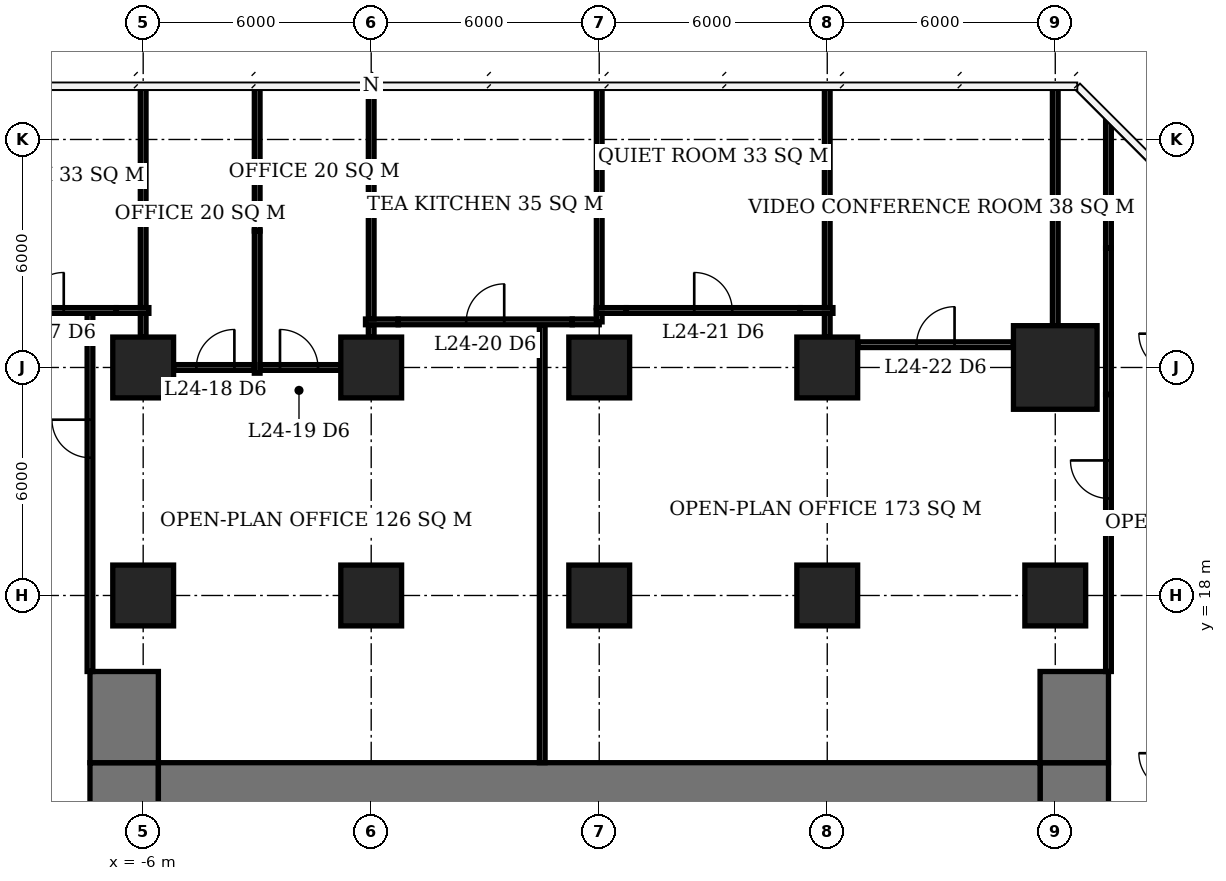
"""IFC4 building model, lengths in metres.
Left out: names, types, materials, properties, quantities, classifications, styles, units other than length and angle.
Written with IfcOpenShell. Run it as: python <this file> out.ifc"""

import sys

from ifc_helpers import new_model, si_unit, direction, frame, frame_2d, origin, origin_2d, place, context, subcontext, project, spatial, rectangle, extrude, element, fill, save


model = new_model("IFC4")
c1 = context("Model", 3, precision=1e-05, world=origin(), true_north=direction((0.0, 1.0)))
c2 = subcontext(c1, "Body", "Model", "MODEL_VIEW")
j1 = project(units=[si_unit("LENGTHUNIT", "METRE"), si_unit("PLANEANGLEUNIT", "RADIAN")], contexts=[c1])
p1 = place(None, origin())
s1 = spatial("IfcSite", under=j1, at=p1, CompositionType="ELEMENT")
p2 = place(p1, origin())
s2 = spatial("IfcBuilding", under=s1, at=p2, CompositionType="ELEMENT")
p3 = place(p2, frame((0.0, 0.0, 101.6)))
s3 = spatial("IfcBuildingStorey", under=s2, at=p3, CompositionType="ELEMENT", Elevation=101.6)
for number, where, z_axis, x_axis in (
    (1, (-6.0, 18.0, 0.0), (0.0, 0.0, 1.0), (1.0, 0.0, 0.0)),
    (2, (-6.0, 24.0, 0.0), (0.0, 0.0, 1.0), (1.0, 0.0, 0.0)),
    (3, (0.0, 18.0, 0.0), (0.0, 0.0, 1.0), (1.0, 0.0, 0.0)),
    (4, (0.0, 24.0, 0.0), (0.0, 0.0, 1.0), (1.0, 0.0, 0.0)),
    (5, (6.0, 18.0, 0.0), (0.0, 0.0, 1.0), (1.0, 0.0, 0.0)),
    (6, (6.0, 24.0, 0.0), (0.0, 0.0, 1.0), (1.0, 0.0, 0.0)),
    (7, (12.0, 18.0, 0.0), (0.0, 0.0, 1.0), (1.0, 0.0, 0.0)),
    (8, (12.0, 24.0, 0.0), (0.0, 0.0, 1.0), (1.0, 0.0, 0.0)),
    (9, (18.0, 18.0, 0.0), (0.0, 0.0, 1.0), (1.0, 0.0, 0.0)),
):
    element("IfcColumn", number, at=place(p3, frame(where, z_axis=z_axis, x_axis=x_axis)), inside=s3, PredefinedType="COLUMN", context=c2, shape_type="SweptSolid", body=[
        extrude(rectangle(XDim=1.6, YDim=1.6, at=origin_2d()), origin(), (0.0, 0.0, 1.0), 3.9),
    ])
p4 = place(p3, frame((18.0, 24.0, 0.0), z_axis=(0.0, 0.0, 1.0), x_axis=(1.0, 0.0, 0.0)))
e10 = element("IfcColumn", 10, at=p4, inside=s3, PredefinedType="COLUMN", context=c2, shape_type="SweptSolid", body=[
    extrude(rectangle(XDim=2.2, YDim=2.2, at=origin_2d()), origin(), (0.0, 0.0, 1.0), 3.9),
])
p5 = place(p3, frame((-5.6, 12.6, 0.0), z_axis=(0.0, 0.0, 1.0), x_axis=(1.0, 0.0, 0.0)))
e11 = element("IfcWall", 11, at=p5, inside=s3, PredefinedType="SHEAR", context=c2, shape_type="SweptSolid", body=[
    extrude(rectangle(XDim=23.2, YDim=2.0, at=frame_2d((11.6, 0.0))), origin(), (0.0, 0.0, 1.0), 3.9),
])
p6 = place(p3, frame((-6.5, -7.6, 0.0), z_axis=(0.0, 0.0, 1.0), x_axis=(0.0, 1.0, 0.0)))
e12 = element("IfcWall", 12, at=p6, inside=s3, PredefinedType="SHEAR", context=c2, shape_type="SweptSolid", body=[
    extrude(rectangle(XDim=21.2, YDim=1.8, at=frame_2d((10.6, 0.0))), origin(), (0.0, 0.0, 1.0), 3.9),
])
p7 = place(p6, frame((7.8, 0.0, 0.0)))
e13 = element("IfcOpeningElement", 13, at=p7, cuts=e12, PredefinedType="OPENING", context=c2, shape_type="SweptSolid", body=[
    extrude(rectangle(XDim=1.8, YDim=2.4, at=frame_2d((0.9, 1.2))), frame((0.0, 0.91, 0.0), z_axis=(0.0, -1.0, 0.0), x_axis=(1.0, 0.0, 0.0)), (0.0, 0.0, 1.0), 1.82),
])
p8 = place(p3, frame((18.5, -7.6, 0.0), z_axis=(0.0, 0.0, 1.0), x_axis=(0.0, 1.0, 0.0)))
e14 = element("IfcWall", 14, at=p8, inside=s3, PredefinedType="SHEAR", context=c2, shape_type="SweptSolid", body=[
    extrude(rectangle(XDim=21.2, YDim=1.8, at=frame_2d((10.6, 0.0))), origin(), (0.0, 0.0, 1.0), 3.9),
])
p9 = place(p8, frame((9.2, 0.0, 0.0)))
e15 = element("IfcOpeningElement", 15, at=p9, cuts=e14, PredefinedType="OPENING", context=c2, shape_type="SweptSolid", body=[
    extrude(rectangle(XDim=1.8, YDim=2.4, at=frame_2d((0.9, 1.2))), frame((0.0, 0.91, 0.0), z_axis=(0.0, -1.0, 0.0), x_axis=(1.0, 0.0, 0.0)), (0.0, 0.0, 1.0), 1.82),
])
for number, where, z_axis, x_axis in (
    (16, (-6.5, 13.6, 0.0), (0.0, 0.0, 1.0), (0.0, 1.0, 0.0)),
    (17, (18.5, 13.6, 0.0), (0.0, 0.0, 1.0), (0.0, 1.0, 0.0)),
):
    element("IfcWall", number, at=place(p3, frame(where, z_axis=z_axis, x_axis=x_axis)), inside=s3, PredefinedType="SHEAR", context=c2, shape_type="SweptSolid", body=[
        extrude(rectangle(XDim=2.4, YDim=1.8, at=frame_2d((1.2, 0.0))), origin(), (0.0, 0.0, 1.0), 3.9),
    ])
p10 = place(p3, frame((-5.2, 24.0, 0.0), z_axis=(0.0, 0.0, 1.0), x_axis=(1.0, 0.0, 0.0)))
e18 = element("IfcWall", 18, at=p10, inside=s3, PredefinedType="PARTITIONING", context=c2, shape_type="SweptSolid", body=[
    extrude(rectangle(XDim=2.125, YDim=0.15, at=frame_2d((1.062, 0.0))), origin(), (0.0, 0.0, 1.0), 3.65),
])
p11 = place(p10, frame((0.6, 0.0, 0.0)))
e19 = element("IfcOpeningElement", 19, at=p11, cuts=e18, PredefinedType="OPENING", context=c2, shape_type="SweptSolid", body=[
    extrude(rectangle(XDim=1.0, YDim=2.1, at=frame_2d((0.5, 1.05))), frame((0.0, 0.085, 0.0), z_axis=(0.0, -1.0, 0.0), x_axis=(1.0, 0.0, 0.0)), (0.0, 0.0, 1.0), 0.17),
])
p12 = place(p3, frame((-2.925, 24.0, 0.0), z_axis=(0.0, 0.0, 1.0), x_axis=(1.0, 0.0, 0.0)))
e20 = element("IfcWall", 20, at=p12, inside=s3, PredefinedType="PARTITIONING", context=c2, shape_type="SweptSolid", body=[
    extrude(rectangle(XDim=2.125, YDim=0.15, at=frame_2d((1.062, 0.0))), origin(), (0.0, 0.0, 1.0), 3.65),
])
p13 = place(p12, frame((0.525, 0.0, 0.0)))
e21 = element("IfcOpeningElement", 21, at=p13, cuts=e20, PredefinedType="OPENING", context=c2, shape_type="SweptSolid", body=[
    extrude(rectangle(XDim=1.0, YDim=2.1, at=frame_2d((0.5, 1.05))), frame((0.0, 0.085, 0.0), z_axis=(0.0, -1.0, 0.0), x_axis=(1.0, 0.0, 0.0)), (0.0, 0.0, 1.0), 0.17),
])
p14 = place(p3, frame((12.8, 24.6, 0.0), z_axis=(0.0, 0.0, 1.0), x_axis=(1.0, 0.0, 0.0)))
e22 = element("IfcWall", 22, at=p14, inside=s3, PredefinedType="PARTITIONING", context=c2, shape_type="SweptSolid", body=[
    extrude(rectangle(XDim=4.1, YDim=0.15, at=frame_2d((2.05, 0.0))), origin(), (0.0, 0.0, 1.0), 3.65),
])
p15 = place(p14, frame((1.55, 0.0, 0.0)))
e23 = element("IfcOpeningElement", 23, at=p15, cuts=e22, PredefinedType="OPENING", context=c2, shape_type="SweptSolid", body=[
    extrude(rectangle(XDim=1.0, YDim=2.1, at=frame_2d((0.5, 1.05))), frame((0.0, 0.085, 0.0), z_axis=(0.0, -1.0, 0.0), x_axis=(1.0, 0.0, 0.0)), (0.0, 0.0, 1.0), 0.17),
])
p16 = place(p3, frame((-0.15, 25.2, 0.0), z_axis=(0.0, 0.0, 1.0), x_axis=(1.0, 0.0, 0.0)))
e24 = element("IfcWall", 24, at=p16, inside=s3, PredefinedType="PARTITIONING", context=c2, shape_type="SweptSolid", body=[
    extrude(rectangle(XDim=0.86, YDim=0.15, at=frame_2d((0.43, 0.0))), origin(), (0.0, 0.0, 1.0), 2.65),
])
p17 = place(p3, frame((0.71, 25.2, 0.0), z_axis=(0.0, 0.0, 1.0), x_axis=(1.0, 0.0, 0.0)))
e25 = element("IfcWall", 25, at=p17, inside=s3, PredefinedType="PARTITIONING", context=c2, shape_type="SweptSolid", body=[
    extrude(rectangle(XDim=4.58, YDim=0.15, at=frame_2d((2.29, 0.0))), origin(), (0.0, 0.0, 1.0), 3.65),
])
p18 = place(p17, frame((1.79, 0.0, 0.0)))
e26 = element("IfcOpeningElement", 26, at=p18, cuts=e25, PredefinedType="OPENING", context=c2, shape_type="SweptSolid", body=[
    extrude(rectangle(XDim=1.0, YDim=2.1, at=frame_2d((0.5, 1.05))), frame((0.0, 0.085, 0.0), z_axis=(0.0, -1.0, 0.0), x_axis=(1.0, 0.0, 0.0)), (0.0, 0.0, 1.0), 0.17),
])
p19 = place(p3, frame((5.29, 25.2, 0.0), z_axis=(0.0, 0.0, 1.0), x_axis=(1.0, 0.0, 0.0)))
e27 = element("IfcWall", 27, at=p19, inside=s3, PredefinedType="PARTITIONING", context=c2, shape_type="SweptSolid", body=[
    extrude(rectangle(XDim=0.71, YDim=0.15, at=frame_2d((0.355, 0.0))), origin(), (0.0, 0.0, 1.0), 2.65),
])
p20 = place(p3, frame((-11.49, 25.5, 0.0), z_axis=(0.0, 0.0, 1.0), x_axis=(1.0, 0.0, 0.0)))
e28 = element("IfcWall", 28, at=p20, inside=s3, PredefinedType="PARTITIONING", context=c2, shape_type="SweptSolid", body=[
    extrude(rectangle(XDim=4.78, YDim=0.15, at=frame_2d((2.39, 0.0))), origin(), (0.0, 0.0, 1.0), 3.65),
])
p21 = place(p20, frame((2.4, 0.0, 0.0)))
e29 = element("IfcOpeningElement", 29, at=p21, cuts=e28, PredefinedType="OPENING", context=c2, shape_type="SweptSolid", body=[
    extrude(rectangle(XDim=1.0, YDim=2.1, at=frame_2d((0.5, 1.05))), frame((0.0, 0.085, 0.0), z_axis=(0.0, -1.0, 0.0), x_axis=(1.0, 0.0, 0.0)), (0.0, 0.0, 1.0), 0.17),
])
p22 = place(p3, frame((-6.71, 25.5, 0.0), z_axis=(0.0, 0.0, 1.0), x_axis=(1.0, 0.0, 0.0)))
e30 = element("IfcWall", 30, at=p22, inside=s3, PredefinedType="PARTITIONING", context=c2, shape_type="SweptSolid", body=[
    extrude(rectangle(XDim=0.86, YDim=0.15, at=frame_2d((0.43, 0.0))), origin(), (0.0, 0.0, 1.0), 2.65),
])
p23 = place(p3, frame((5.925, 25.5, 0.0), z_axis=(0.0, 0.0, 1.0), x_axis=(1.0, 0.0, 0.0)))
e31 = element("IfcWall", 31, at=p23, inside=s3, PredefinedType="PARTITIONING", context=c2, shape_type="SweptSolid", body=[
    extrude(rectangle(XDim=0.785, YDim=0.15, at=frame_2d((0.393, 0.0))), origin(), (0.0, 0.0, 1.0), 2.65),
])
p24 = place(p3, frame((6.71, 25.5, 0.0), z_axis=(0.0, 0.0, 1.0), x_axis=(1.0, 0.0, 0.0)))
e32 = element("IfcWall", 32, at=p24, inside=s3, PredefinedType="PARTITIONING", context=c2, shape_type="SweptSolid", body=[
    extrude(rectangle(XDim=4.58, YDim=0.15, at=frame_2d((2.29, 0.0))), origin(), (0.0, 0.0, 1.0), 3.65),
])
p25 = place(p24, frame((1.79, 0.0, 0.0)))
e33 = element("IfcOpeningElement", 33, at=p25, cuts=e32, PredefinedType="OPENING", context=c2, shape_type="SweptSolid", body=[
    extrude(rectangle(XDim=1.0, YDim=2.1, at=frame_2d((0.5, 1.05))), frame((0.0, 0.085, 0.0), z_axis=(0.0, -1.0, 0.0), x_axis=(1.0, 0.0, 0.0)), (0.0, 0.0, 1.0), 0.17),
])
p26 = place(p3, frame((11.29, 25.5, 0.0), z_axis=(0.0, 0.0, 1.0), x_axis=(1.0, 0.0, 0.0)))
e34 = element("IfcWall", 34, at=p26, inside=s3, PredefinedType="PARTITIONING", context=c2, shape_type="SweptSolid", body=[
    extrude(rectangle(XDim=0.86, YDim=0.15, at=frame_2d((0.43, 0.0))), origin(), (0.0, 0.0, 1.0), 2.65),
])
p27 = place(p3, frame((-6.0, 24.8, 0.0), z_axis=(0.0, 0.0, 1.0), x_axis=(0.0, 1.0, 0.0)))
e35 = element("IfcWall", 35, at=p27, inside=s3, PredefinedType="PARTITIONING", context=c2, shape_type="SweptSolid", body=[
    extrude(rectangle(XDim=0.625, YDim=0.15, at=frame_2d((0.312, 0.0))), origin(), (0.0, 0.0, 1.0), 2.65),
])
p28 = place(p3, frame((-6.0, 25.575, 0.0), z_axis=(0.0, 0.0, 1.0), x_axis=(0.0, 1.0, 0.0)))
e36 = element("IfcWall", 36, at=p28, inside=s3, PredefinedType="PARTITIONING", context=c2, shape_type="SweptSolid", body=[
    extrude(rectangle(XDim=2.735, YDim=0.15, at=frame_2d((1.368, 0.0))), origin(), (0.0, 0.0, 1.0), 2.65),
])
p29 = place(p3, frame((-6.0, 28.31, 0.0), z_axis=(0.0, 0.0, 1.0), x_axis=(0.0, 1.0, 0.0)))
e37 = element("IfcWall", 37, at=p29, inside=s3, PredefinedType="PARTITIONING", context=c2, shape_type="SweptSolid", body=[
    extrude(rectangle(XDim=3.09, YDim=0.15, at=frame_2d((1.545, 0.0))), origin(), (0.0, 0.0, 1.0), 3.65),
])
p30 = place(p3, frame((-3.0, 23.85, 0.0), z_axis=(0.0, 0.0, 1.0), x_axis=(0.0, 1.0, 0.0)))
e38 = element("IfcWall", 38, at=p30, inside=s3, PredefinedType="PARTITIONING", context=c2, shape_type="SweptSolid", body=[
    extrude(rectangle(XDim=3.74, YDim=0.15, at=frame_2d((1.87, 0.0))), origin(), (0.0, 0.0, 1.0), 3.65),
])
p31 = place(p3, frame((-3.0, 27.59, 0.0), z_axis=(0.0, 0.0, 1.0), x_axis=(0.0, 1.0, 0.0)))
e39 = element("IfcWall", 39, at=p31, inside=s3, PredefinedType="PARTITIONING", context=c2, shape_type="SweptSolid", body=[
    extrude(rectangle(XDim=0.72, YDim=0.15, at=frame_2d((0.36, 0.0))), origin(), (0.0, 0.0, 1.0), 2.65),
])
p32 = place(p3, frame((-3.0, 28.31, 0.0), z_axis=(0.0, 0.0, 1.0), x_axis=(0.0, 1.0, 0.0)))
e40 = element("IfcWall", 40, at=p32, inside=s3, PredefinedType="PARTITIONING", context=c2, shape_type="SweptSolid", body=[
    extrude(rectangle(XDim=3.04, YDim=0.15, at=frame_2d((1.52, 0.0))), origin(), (0.0, 0.0, 1.0), 3.65),
])
p33 = place(p3, frame((0.0, 24.8, 0.0), z_axis=(0.0, 0.0, 1.0), x_axis=(0.0, 1.0, 0.0)))
e41 = element("IfcWall", 41, at=p33, inside=s3, PredefinedType="PARTITIONING", context=c2, shape_type="SweptSolid", body=[
    extrude(rectangle(XDim=0.325, YDim=0.15, at=frame_2d((0.163, 0.0))), origin(), (0.0, 0.0, 1.0), 2.65),
])
p34 = place(p3, frame((0.0, 25.275, 0.0), z_axis=(0.0, 0.0, 1.0), x_axis=(0.0, 1.0, 0.0)))
e42 = element("IfcWall", 42, at=p34, inside=s3, PredefinedType="PARTITIONING", context=c2, shape_type="SweptSolid", body=[
    extrude(rectangle(XDim=3.035, YDim=0.15, at=frame_2d((1.518, 0.0))), origin(), (0.0, 0.0, 1.0), 2.65),
])
p35 = place(p3, frame((0.0, 28.31, 0.0), z_axis=(0.0, 0.0, 1.0), x_axis=(0.0, 1.0, 0.0)))
e43 = element("IfcWall", 43, at=p35, inside=s3, PredefinedType="PARTITIONING", context=c2, shape_type="SweptSolid", body=[
    extrude(rectangle(XDim=3.04, YDim=0.15, at=frame_2d((1.52, 0.0))), origin(), (0.0, 0.0, 1.0), 3.65),
])
p36 = place(p3, frame((6.0, 25.2, 0.0), z_axis=(0.0, 0.0, 1.0), x_axis=(0.0, 1.0, 0.0)))
e44 = element("IfcWall", 44, at=p36, inside=s3, PredefinedType="PARTITIONING", context=c2, shape_type="SweptSolid", body=[
    extrude(rectangle(XDim=0.3, YDim=0.15, at=frame_2d((0.15, 0.0))), origin(), (0.0, 0.0, 1.0), 2.65),
])
p37 = place(p3, frame((6.0, 25.575, 0.0), z_axis=(0.0, 0.0, 1.0), x_axis=(0.0, 1.0, 0.0)))
e45 = element("IfcWall", 45, at=p37, inside=s3, PredefinedType="PARTITIONING", context=c2, shape_type="SweptSolid", body=[
    extrude(rectangle(XDim=2.735, YDim=0.15, at=frame_2d((1.368, 0.0))), origin(), (0.0, 0.0, 1.0), 2.65),
])
p38 = place(p3, frame((6.0, 28.31, 0.0), z_axis=(0.0, 0.0, 1.0), x_axis=(0.0, 1.0, 0.0)))
e46 = element("IfcWall", 46, at=p38, inside=s3, PredefinedType="PARTITIONING", context=c2, shape_type="SweptSolid", body=[
    extrude(rectangle(XDim=3.09, YDim=0.15, at=frame_2d((1.545, 0.0))), origin(), (0.0, 0.0, 1.0), 3.65),
])
p39 = place(p3, frame((12.0, 24.8, 0.0), z_axis=(0.0, 0.0, 1.0), x_axis=(0.0, 1.0, 0.0)))
e47 = element("IfcWall", 47, at=p39, inside=s3, PredefinedType="PARTITIONING", context=c2, shape_type="SweptSolid", body=[
    extrude(rectangle(XDim=0.625, YDim=0.15, at=frame_2d((0.312, 0.0))), origin(), (0.0, 0.0, 1.0), 2.65),
])
p40 = place(p3, frame((12.0, 25.575, 0.0), z_axis=(0.0, 0.0, 1.0), x_axis=(0.0, 1.0, 0.0)))
e48 = element("IfcWall", 48, at=p40, inside=s3, PredefinedType="PARTITIONING", context=c2, shape_type="SweptSolid", body=[
    extrude(rectangle(XDim=2.735, YDim=0.15, at=frame_2d((1.368, 0.0))), origin(), (0.0, 0.0, 1.0), 2.65),
])
p41 = place(p3, frame((12.0, 28.31, 0.0), z_axis=(0.0, 0.0, 1.0), x_axis=(0.0, 1.0, 0.0)))
e49 = element("IfcWall", 49, at=p41, inside=s3, PredefinedType="PARTITIONING", context=c2, shape_type="SweptSolid", body=[
    extrude(rectangle(XDim=3.09, YDim=0.15, at=frame_2d((1.545, 0.0))), origin(), (0.0, 0.0, 1.0), 3.65),
])
p42 = place(p3, frame((18.0, 25.1, 0.0), z_axis=(0.0, 0.0, 1.0), x_axis=(0.0, 1.0, 0.0)))
e50 = element("IfcWall", 50, at=p42, inside=s3, PredefinedType="PARTITIONING", context=c2, shape_type="SweptSolid", body=[
    extrude(rectangle(XDim=3.21, YDim=0.15, at=frame_2d((1.605, 0.0))), origin(), (0.0, 0.0, 1.0), 2.65),
])
p43 = place(p3, frame((18.0, 28.31, 0.0), z_axis=(0.0, 0.0, 1.0), x_axis=(0.0, 1.0, 0.0)))
e51 = element("IfcWall", 51, at=p43, inside=s3, PredefinedType="PARTITIONING", context=c2, shape_type="SweptSolid", body=[
    extrude(rectangle(XDim=3.09, YDim=0.15, at=frame_2d((1.545, 0.0))), origin(), (0.0, 0.0, 1.0), 3.65),
])
p44 = place(p3, frame((-7.4, 16.0, 0.0), z_axis=(0.0, 0.0, 1.0), x_axis=(0.0, 1.0, 0.0)))
e52 = element("IfcWall", 52, at=p44, inside=s3, PredefinedType="PARTITIONING", context=c2, shape_type="SweptSolid", body=[
    extrude(rectangle(XDim=9.425, YDim=0.15, at=frame_2d((4.712, 0.0))), origin(), (0.0, 0.0, 1.0), 3.65),
])
p45 = place(p44, frame((5.626, 0.0, 0.0)))
e53 = element("IfcOpeningElement", 53, at=p45, cuts=e52, PredefinedType="OPENING", context=c2, shape_type="SweptSolid", body=[
    extrude(rectangle(XDim=1.0, YDim=2.1, at=frame_2d((0.5, 1.05))), frame((0.0, 0.085, 0.0), z_axis=(0.0, -1.0, 0.0), x_axis=(1.0, 0.0, 0.0)), (0.0, 0.0, 1.0), 0.17),
])
p46 = place(p3, frame((4.5, 13.6, 0.0), z_axis=(0.0, 0.0, 1.0), x_axis=(0.0, 1.0, 0.0)))
e54 = element("IfcWall", 54, at=p46, inside=s3, PredefinedType="PARTITIONING", context=c2, shape_type="SweptSolid", body=[
    extrude(rectangle(XDim=11.525, YDim=0.15, at=frame_2d((5.762, 0.0))), origin(), (0.0, 0.0, 1.0), 3.65),
])
p47 = place(p3, frame((19.4, 16.0, 0.0), z_axis=(0.0, 0.0, 1.0), x_axis=(0.0, 1.0, 0.0)))
e55 = element("IfcWall", 55, at=p47, inside=s3, PredefinedType="PARTITIONING", context=c2, shape_type="SweptSolid", body=[
    extrude(rectangle(XDim=7.29, YDim=0.15, at=frame_2d((3.645, 0.0))), origin(), (0.0, 0.0, 1.0), 3.65),
])
p48 = place(p47, frame((4.554, 0.0, 0.0)))
e56 = element("IfcOpeningElement", 56, at=p48, cuts=e55, PredefinedType="OPENING", context=c2, shape_type="SweptSolid", body=[
    extrude(rectangle(XDim=1.0, YDim=2.1, at=frame_2d((0.5, 1.05))), frame((0.0, 0.085, 0.0), z_axis=(0.0, -1.0, 0.0), x_axis=(1.0, 0.0, 0.0)), (0.0, 0.0, 1.0), 0.17),
])
p49 = place(p3, frame((19.4, 23.29, 0.0), z_axis=(0.0, 0.0, 1.0), x_axis=(0.0, 1.0, 0.0)))
e57 = element("IfcWall", 57, at=p49, inside=s3, PredefinedType="PARTITIONING", context=c2, shape_type="SweptSolid", body=[
    extrude(rectangle(XDim=3.85, YDim=0.15, at=frame_2d((1.925, 0.0))), origin(), (0.0, 0.0, 1.0), 2.65),
])
p50 = place(p3, frame((19.4, 27.14, 0.0), z_axis=(0.0, 0.0, 1.0), x_axis=(0.0, 1.0, 0.0)))
e58 = element("IfcWall", 58, at=p50, inside=s3, PredefinedType="PARTITIONING", context=c2, shape_type="SweptSolid", body=[
    extrude(rectangle(XDim=3.349, YDim=0.15, at=frame_2d((1.675, 0.0))), origin(), (0.0, 0.0, 1.0), 3.65),
])
p51 = place(p21, origin())
e59 = element("IfcDoor", 59, at=p51, inside=s3, OperationType="SINGLE_SWING_RIGHT", PredefinedType="DOOR", context=c2, shape_type="SweptSolid", body=[
    extrude(rectangle(XDim=1.0, YDim=2.1, at=frame_2d((0.5, 1.05))), frame((0.0, 0.025, 0.0), z_axis=(0.0, -1.0, 0.0), x_axis=(1.0, 0.0, 0.0)), (0.0, 0.0, 1.0), 0.05),
])
fill(e29, e59)
p52 = place(p11, origin())
e60 = element("IfcDoor", 60, at=p52, inside=s3, OperationType="SINGLE_SWING_RIGHT", PredefinedType="DOOR", context=c2, shape_type="SweptSolid", body=[
    extrude(rectangle(XDim=1.0, YDim=2.1, at=frame_2d((0.5, 1.05))), frame((0.0, 0.025, 0.0), z_axis=(0.0, -1.0, 0.0), x_axis=(1.0, 0.0, 0.0)), (0.0, 0.0, 1.0), 0.05),
])
fill(e19, e60)
p53 = place(p13, origin())
e61 = element("IfcDoor", 61, at=p53, inside=s3, OperationType="SINGLE_SWING_LEFT", PredefinedType="DOOR", context=c2, shape_type="SweptSolid", body=[
    extrude(rectangle(XDim=1.0, YDim=2.1, at=frame_2d((0.5, 1.05))), frame((0.0, 0.025, 0.0), z_axis=(0.0, -1.0, 0.0), x_axis=(1.0, 0.0, 0.0)), (0.0, 0.0, 1.0), 0.05),
])
fill(e21, e61)
p54 = place(p18, origin())
e62 = element("IfcDoor", 62, at=p54, inside=s3, OperationType="SINGLE_SWING_RIGHT", PredefinedType="DOOR", context=c2, shape_type="SweptSolid", body=[
    extrude(rectangle(XDim=1.0, YDim=2.1, at=frame_2d((0.5, 1.05))), frame((0.0, 0.025, 0.0), z_axis=(0.0, -1.0, 0.0), x_axis=(1.0, 0.0, 0.0)), (0.0, 0.0, 1.0), 0.05),
])
fill(e26, e62)
p55 = place(p25, origin())
e63 = element("IfcDoor", 63, at=p55, inside=s3, OperationType="SINGLE_SWING_LEFT", PredefinedType="DOOR", context=c2, shape_type="SweptSolid", body=[
    extrude(rectangle(XDim=1.0, YDim=2.1, at=frame_2d((0.5, 1.05))), frame((0.0, 0.025, 0.0), z_axis=(0.0, -1.0, 0.0), x_axis=(1.0, 0.0, 0.0)), (0.0, 0.0, 1.0), 0.05),
])
fill(e33, e63)
p56 = place(p15, origin())
e64 = element("IfcDoor", 64, at=p56, inside=s3, OperationType="SINGLE_SWING_RIGHT", PredefinedType="DOOR", context=c2, shape_type="SweptSolid", body=[
    extrude(rectangle(XDim=1.0, YDim=2.1, at=frame_2d((0.5, 1.05))), frame((0.0, 0.025, 0.0), z_axis=(0.0, -1.0, 0.0), x_axis=(1.0, 0.0, 0.0)), (0.0, 0.0, 1.0), 0.05),
])
fill(e23, e64)
p57 = place(p45, origin())
e65 = element("IfcDoor", 65, at=p57, inside=s3, OperationType="SINGLE_SWING_RIGHT", PredefinedType="DOOR", context=c2, shape_type="SweptSolid", body=[
    extrude(rectangle(XDim=1.0, YDim=2.1, at=frame_2d((0.5, 1.05))), frame((0.0, 0.025, 0.0), z_axis=(0.0, -1.0, 0.0), x_axis=(1.0, 0.0, 0.0)), (0.0, 0.0, 1.0), 0.05),
])
fill(e53, e65)
p58 = place(p48, origin())
e66 = element("IfcDoor", 66, at=p58, inside=s3, OperationType="SINGLE_SWING_RIGHT", PredefinedType="DOOR", context=c2, shape_type="SweptSolid", body=[
    extrude(rectangle(XDim=1.0, YDim=2.1, at=frame_2d((0.5, 1.05))), frame((0.0, 0.025, 0.0), z_axis=(0.0, -1.0, 0.0), x_axis=(1.0, 0.0, 0.0)), (0.0, 0.0, 1.0), 0.05),
])
fill(e56, e66)
save(model, sys.argv[1])
